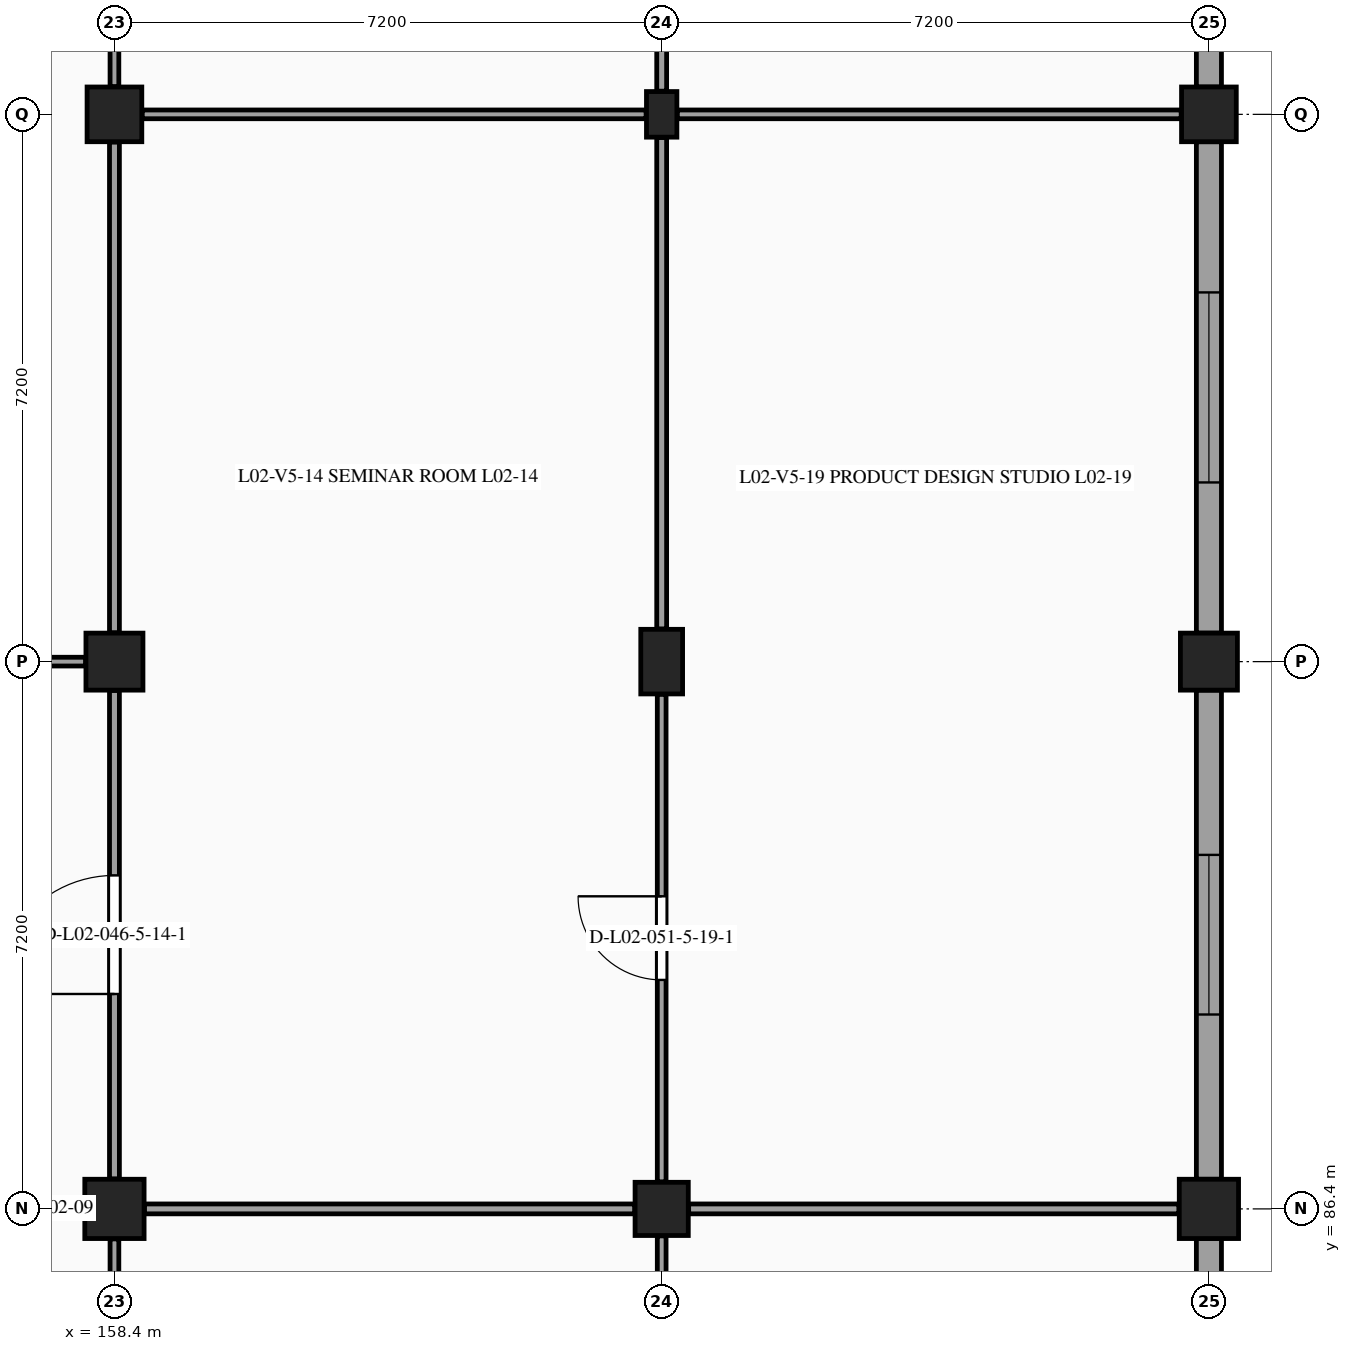
"""IFC4 building model, lengths in metres.
Left out: names, types, materials, properties, quantities, classifications, styles, units other than length and angle.
Written with IfcOpenShell. Run it as: python <this file> out.ifc"""

import sys

from ifc_helpers import new_model, si_unit, direction, frame, frame_2d, origin, origin_2d, place, context, subcontext, project, spatial, rectangle, extrude, element, fill, save


model = new_model("IFC4")
c1 = context("Model", 3, precision=1e-05, world=origin(), true_north=direction((0.0, 1.0)))
c2 = subcontext(c1, "Body", "Model", "MODEL_VIEW")
j1 = project(units=[si_unit("LENGTHUNIT", "METRE"), si_unit("PLANEANGLEUNIT", "RADIAN")], contexts=[c1])
p1 = place(None, origin())
s1 = spatial("IfcSite", under=j1, at=p1, CompositionType="ELEMENT")
p2 = place(p1, origin())
s2 = spatial("IfcBuilding", under=s1, at=p2, CompositionType="ELEMENT")
p3 = place(p2, frame((0.0, 0.0, 9.9)))
s3 = spatial("IfcBuildingStorey", under=s2, at=p3, CompositionType="ELEMENT", Elevation=9.9)
p4 = place(p3, frame((158.4, 86.4, 0.0), z_axis=(0.0, 0.0, 1.0), x_axis=(1.0, 0.0, 0.0)))
e1 = element("IfcColumn", 1, at=p4, inside=s3, PredefinedType="COLUMN", context=c2, shape_type="SweptSolid", body=[
    extrude(rectangle(XDim=0.78, YDim=0.78, at=origin_2d()), origin(), (0.0, 0.0, 1.0), 4.5),
])
p5 = place(p3, frame((158.4, 93.6, 0.0), z_axis=(0.0, 0.0, 1.0), x_axis=(1.0, 0.0, 0.0)))
e2 = element("IfcColumn", 2, at=p5, inside=s3, PredefinedType="COLUMN", context=c2, shape_type="SweptSolid", body=[
    extrude(rectangle(XDim=0.75, YDim=0.75, at=origin_2d()), origin(), (0.0, 0.0, 1.0), 4.5),
])
p6 = place(p3, frame((158.4, 100.8, 0.0), z_axis=(0.0, 0.0, 1.0), x_axis=(1.0, 0.0, 0.0)))
e3 = element("IfcColumn", 3, at=p6, inside=s3, PredefinedType="COLUMN", context=c2, shape_type="SweptSolid", body=[
    extrude(rectangle(XDim=0.72, YDim=0.72, at=origin_2d()), origin(), (0.0, 0.0, 1.0), 4.5),
])
p7 = place(p3, frame((165.6, 86.4, 0.0), z_axis=(0.0, 0.0, 1.0), x_axis=(1.0, 0.0, 0.0)))
e4 = element("IfcColumn", 4, at=p7, inside=s3, PredefinedType="COLUMN", context=c2, shape_type="SweptSolid", body=[
    extrude(rectangle(XDim=0.7, YDim=0.7, at=origin_2d()), origin(), (0.0, 0.0, 1.0), 4.5),
])
p8 = place(p3, frame((165.6, 93.6, 0.0), z_axis=(0.0, 0.0, 1.0), x_axis=(1.0, 0.0, 0.0)))
e5 = element("IfcColumn", 5, at=p8, inside=s3, PredefinedType="COLUMN", context=c2, shape_type="SweptSolid", body=[
    extrude(rectangle(XDim=0.55, YDim=0.85, at=origin_2d()), origin(), (0.0, 0.0, 1.0), 4.5),
])
p9 = place(p3, frame((165.6, 100.8, 0.0), z_axis=(0.0, 0.0, 1.0), x_axis=(1.0, 0.0, 0.0)))
e6 = element("IfcColumn", 6, at=p9, inside=s3, PredefinedType="PILASTER", context=c2, shape_type="SweptSolid", body=[
    extrude(rectangle(XDim=0.4, YDim=0.6, at=origin_2d()), origin(), (0.0, 0.0, 1.0), 4.5),
])
p10 = place(p3, frame((172.8, 86.4, 0.0), z_axis=(0.0, 0.0, 1.0), x_axis=(1.0, 0.0, 0.0)))
e7 = element("IfcColumn", 7, at=p10, inside=s3, PredefinedType="COLUMN", context=c2, shape_type="SweptSolid", body=[
    extrude(rectangle(XDim=0.78, YDim=0.78, at=origin_2d()), origin(), (0.0, 0.0, 1.0), 4.5),
])
p11 = place(p3, frame((172.8, 93.6, 0.0), z_axis=(0.0, 0.0, 1.0), x_axis=(1.0, 0.0, 0.0)))
e8 = element("IfcColumn", 8, at=p11, inside=s3, PredefinedType="COLUMN", context=c2, shape_type="SweptSolid", body=[
    extrude(rectangle(XDim=0.75, YDim=0.75, at=origin_2d()), origin(), (0.0, 0.0, 1.0), 4.5),
])
p12 = place(p3, frame((172.8, 100.8, 0.0), z_axis=(0.0, 0.0, 1.0), x_axis=(1.0, 0.0, 0.0)))
e9 = element("IfcColumn", 9, at=p12, inside=s3, PredefinedType="COLUMN", context=c2, shape_type="SweptSolid", body=[
    extrude(rectangle(XDim=0.72, YDim=0.72, at=origin_2d()), origin(), (0.0, 0.0, 1.0), 4.5),
])
p13 = place(p3, frame((172.8, 107.65, 0.0), z_axis=(0.0, 0.0, 1.0), x_axis=(0.0, -1.0, 0.0)))
e10 = element("IfcWall", 10, at=p13, inside=s3, PredefinedType="STANDARD", context=c2, shape_type="SweptSolid", body=[
    extrude(rectangle(XDim=6.49, YDim=0.33, at=frame_2d((3.245, 0.0))), origin(), (0.0, 0.0, 1.0), 3.47),
])
p14 = place(p13, frame((1.795, 0.0, 0.98)))
e11 = element("IfcOpeningElement", 11, at=p14, cuts=e10, PredefinedType="OPENING", context=c2, shape_type="SweptSolid", body=[
    extrude(rectangle(XDim=2.9, YDim=1.6, at=frame_2d((1.45, 0.8))), frame((0.0, 0.175, 0.0), z_axis=(0.0, -1.0, 0.0), x_axis=(1.0, 0.0, 0.0)), (0.0, 0.0, 1.0), 0.35),
])
p15 = place(p3, frame((172.8, 100.44, 0.0), z_axis=(0.0, 0.0, 1.0), x_axis=(0.0, -1.0, 0.0)))
e12 = element("IfcWall", 12, at=p15, inside=s3, PredefinedType="STANDARD", context=c2, shape_type="SweptSolid", body=[
    extrude(rectangle(XDim=6.465, YDim=0.33, at=frame_2d((3.232, 0.0))), origin(), (0.0, 0.0, 1.0), 3.47),
])
p16 = place(p15, frame((1.982, 0.0, 0.98)))
e13 = element("IfcOpeningElement", 13, at=p16, cuts=e12, PredefinedType="OPENING", context=c2, shape_type="SweptSolid", body=[
    extrude(rectangle(XDim=2.5, YDim=1.35, at=frame_2d((1.25, 0.675))), frame((0.0, 0.175, 0.0), z_axis=(0.0, -1.0, 0.0), x_axis=(1.0, 0.0, 0.0)), (0.0, 0.0, 1.0), 0.35),
])
p17 = place(p3, frame((172.8, 93.225, 0.0), z_axis=(0.0, 0.0, 1.0), x_axis=(0.0, -1.0, 0.0)))
e14 = element("IfcWall", 14, at=p17, inside=s3, PredefinedType="STANDARD", context=c2, shape_type="SweptSolid", body=[
    extrude(rectangle(XDim=6.435, YDim=0.33, at=frame_2d((3.218, 0.0))), origin(), (0.0, 0.0, 1.0), 3.47),
])
p18 = place(p17, frame((2.167, 0.0, 0.98)))
e15 = element("IfcOpeningElement", 15, at=p18, cuts=e14, PredefinedType="OPENING", context=c2, shape_type="SweptSolid", body=[
    extrude(rectangle(XDim=2.1, YDim=1.3, at=frame_2d((1.05, 0.65))), frame((0.0, 0.175, 0.0), z_axis=(0.0, -1.0, 0.0), x_axis=(1.0, 0.0, 0.0)), (0.0, 0.0, 1.0), 0.35),
])
p19 = place(p3, frame((172.8, 86.01, 0.0), z_axis=(0.0, 0.0, 1.0), x_axis=(0.0, -1.0, 0.0)))
e16 = element("IfcWall", 16, at=p19, inside=s3, PredefinedType="STANDARD", context=c2, shape_type="SweptSolid", body=[
    extrude(rectangle(XDim=6.51, YDim=0.33, at=frame_2d((3.255, 0.0))), origin(), (0.0, 0.0, 1.0), 3.47),
])
p20 = place(p19, frame((0.855, 0.0, 0.98)))
e17 = element("IfcOpeningElement", 17, at=p20, cuts=e16, PredefinedType="OPENING", context=c2, shape_type="SweptSolid", body=[
    extrude(rectangle(XDim=4.8, YDim=1.5, at=frame_2d((2.4, 0.75))), frame((0.0, 0.175, 0.0), z_axis=(0.0, -1.0, 0.0), x_axis=(1.0, 0.0, 0.0)), (0.0, 0.0, 1.0), 0.35),
])
p21 = place(p3, frame((158.4, 79.505, 0.0), z_axis=(0.0, 0.0, 1.0), x_axis=(0.0, 1.0, 0.0)))
e18 = element("IfcWall", 18, at=p21, inside=s3, PredefinedType="PARTITIONING", context=c2, shape_type="SweptSolid", body=[
    extrude(rectangle(XDim=6.5, YDim=0.115, at=frame_2d((3.25, 0.0))), origin(), (0.0, 0.0, 1.0), 3.595),
])
p22 = place(p3, frame((158.4, 86.795, 0.0), z_axis=(0.0, 0.0, 1.0), x_axis=(0.0, 1.0, 0.0)))
e19 = element("IfcWall", 19, at=p22, inside=s3, PredefinedType="PARTITIONING", context=c2, shape_type="SweptSolid", body=[
    extrude(rectangle(XDim=6.425, YDim=0.13, at=frame_2d((3.212, 0.0))), origin(), (0.0, 0.0, 1.0), 3.59),
])
p23 = place(p22, frame((2.433, 0.0, 0.0)))
e20 = element("IfcOpeningElement", 20, at=p23, cuts=e19, PredefinedType="OPENING", context=c2, shape_type="SweptSolid", body=[
    extrude(rectangle(XDim=1.56, YDim=2.25, at=frame_2d((0.78, 1.125))), frame((0.0, 0.075, 0.0), z_axis=(0.0, -1.0, 0.0), x_axis=(1.0, 0.0, 0.0)), (0.0, 0.0, 1.0), 0.15),
])
p24 = place(p3, frame((151.48, 93.6, 0.0), z_axis=(0.0, 0.0, 1.0), x_axis=(1.0, 0.0, 0.0)))
e21 = element("IfcWall", 21, at=p24, inside=s3, PredefinedType="PARTITIONING", context=c2, shape_type="SweptSolid", body=[
    extrude(rectangle(XDim=6.54, YDim=0.115, at=frame_2d((3.27, 0.0))), origin(), (0.0, 0.0, 1.0), 3.5),
])
p25 = place(p3, frame((158.4, 93.98, 0.0), z_axis=(0.0, 0.0, 1.0), x_axis=(0.0, 1.0, 0.0)))
e22 = element("IfcWall", 22, at=p25, inside=s3, PredefinedType="PARTITIONING", context=c2, shape_type="SweptSolid", body=[
    extrude(rectangle(XDim=6.455, YDim=0.13, at=frame_2d((3.228, 0.0))), origin(), (0.0, 0.0, 1.0), 3.54),
])
p26 = place(p3, frame((158.4, 101.165, 0.0), z_axis=(0.0, 0.0, 1.0), x_axis=(0.0, 1.0, 0.0)))
e23 = element("IfcWall", 23, at=p26, inside=s3, PredefinedType="PARTITIONING", context=c2, shape_type="SweptSolid", body=[
    extrude(rectangle(XDim=6.48, YDim=0.115, at=frame_2d((3.24, 0.0))), origin(), (0.0, 0.0, 1.0), 3.54),
])
p27 = place(p26, frame((2.55, 0.0, 0.0)))
e24 = element("IfcOpeningElement", 24, at=p27, cuts=e23, PredefinedType="OPENING", context=c2, shape_type="SweptSolid", body=[
    extrude(rectangle(XDim=1.38, YDim=2.22, at=frame_2d((0.69, 1.11))), frame((0.0, 0.067, 0.0), z_axis=(0.0, -1.0, 0.0), x_axis=(1.0, 0.0, 0.0)), (0.0, 0.0, 1.0), 0.135),
])
p28 = place(p3, frame((165.6, 79.565, 0.0), z_axis=(0.0, 0.0, 1.0), x_axis=(0.0, 1.0, 0.0)))
e25 = element("IfcWall", 25, at=p28, inside=s3, PredefinedType="PARTITIONING", context=c2, shape_type="SweptSolid", body=[
    extrude(rectangle(XDim=6.48, YDim=0.115, at=frame_2d((3.24, 0.0))), origin(), (0.0, 0.0, 1.0), 3.595),
])
p29 = place(p3, frame((158.795, 86.4, 0.0), z_axis=(0.0, 0.0, 1.0), x_axis=(1.0, 0.0, 0.0)))
e26 = element("IfcWall", 26, at=p29, inside=s3, PredefinedType="PARTITIONING", context=c2, shape_type="SweptSolid", body=[
    extrude(rectangle(XDim=6.45, YDim=0.13, at=frame_2d((3.225, 0.0))), origin(), (0.0, 0.0, 1.0), 3.505),
])
p30 = place(p3, frame((165.6, 86.755, 0.0), z_axis=(0.0, 0.0, 1.0), x_axis=(0.0, 1.0, 0.0)))
e27 = element("IfcWall", 27, at=p30, inside=s3, PredefinedType="PARTITIONING", context=c2, shape_type="SweptSolid", body=[
    extrude(rectangle(XDim=6.415, YDim=0.115, at=frame_2d((3.208, 0.0))), origin(), (0.0, 0.0, 1.0), 3.59),
])
p31 = place(p30, frame((2.657, 0.0, 0.0)))
e28 = element("IfcOpeningElement", 28, at=p31, cuts=e27, PredefinedType="OPENING", context=c2, shape_type="SweptSolid", body=[
    extrude(rectangle(XDim=1.1, YDim=2.15, at=frame_2d((0.55, 1.075))), frame((0.0, 0.067, 0.0), z_axis=(0.0, -1.0, 0.0), x_axis=(1.0, 0.0, 0.0)), (0.0, 0.0, 1.0), 0.135),
])
p32 = place(p3, frame((165.6, 94.03, 0.0), z_axis=(0.0, 0.0, 1.0), x_axis=(0.0, 1.0, 0.0)))
e29 = element("IfcWall", 29, at=p32, inside=s3, PredefinedType="PARTITIONING", context=c2, shape_type="SweptSolid", body=[
    extrude(rectangle(XDim=6.465, YDim=0.13, at=frame_2d((3.232, 0.0))), origin(), (0.0, 0.0, 1.0), 3.54),
])
p33 = place(p3, frame((158.765, 100.8, 0.0), z_axis=(0.0, 0.0, 1.0), x_axis=(1.0, 0.0, 0.0)))
e30 = element("IfcWall", 30, at=p33, inside=s3, PredefinedType="PARTITIONING", context=c2, shape_type="SweptSolid", body=[
    extrude(rectangle(XDim=6.63, YDim=0.115, at=frame_2d((3.315, 0.0))), origin(), (0.0, 0.0, 1.0), 3.505),
])
p34 = place(p3, frame((165.6, 101.105, 0.0), z_axis=(0.0, 0.0, 1.0), x_axis=(0.0, 1.0, 0.0)))
e31 = element("IfcWall", 31, at=p34, inside=s3, PredefinedType="PARTITIONING", context=c2, shape_type="SweptSolid", body=[
    extrude(rectangle(XDim=6.5, YDim=0.13, at=frame_2d((3.25, 0.0))), origin(), (0.0, 0.0, 1.0), 3.54),
])
p35 = place(p34, frame((2.775, 0.0, 0.0)))
e32 = element("IfcOpeningElement", 32, at=p35, cuts=e31, PredefinedType="OPENING", context=c2, shape_type="SweptSolid", body=[
    extrude(rectangle(XDim=0.95, YDim=2.15, at=frame_2d((0.475, 1.075))), frame((0.0, 0.075, 0.0), z_axis=(0.0, -1.0, 0.0), x_axis=(1.0, 0.0, 0.0)), (0.0, 0.0, 1.0), 0.15),
])
p36 = place(p3, frame((165.955, 86.4, 0.0), z_axis=(0.0, 0.0, 1.0), x_axis=(1.0, 0.0, 0.0)))
e33 = element("IfcWall", 33, at=p36, inside=s3, PredefinedType="PARTITIONING", context=c2, shape_type="SweptSolid", body=[
    extrude(rectangle(XDim=6.45, YDim=0.13, at=frame_2d((3.225, 0.0))), origin(), (0.0, 0.0, 1.0), 3.525),
])
p37 = place(p3, frame((165.805, 100.8, 0.0), z_axis=(0.0, 0.0, 1.0), x_axis=(1.0, 0.0, 0.0)))
e34 = element("IfcWall", 34, at=p37, inside=s3, PredefinedType="PARTITIONING", context=c2, shape_type="SweptSolid", body=[
    extrude(rectangle(XDim=6.63, YDim=0.115, at=frame_2d((3.315, 0.0))), origin(), (0.0, 0.0, 1.0), 3.525),
])
p38 = place(p16, origin())
e35 = element("IfcWindow", 35, at=p38, inside=s3, PartitioningType="SINGLE_PANEL", PredefinedType="WINDOW", context=c2, shape_type="SweptSolid", body=[
    extrude(rectangle(XDim=2.5, YDim=1.35, at=frame_2d((1.25, 0.675))), frame((0.0, -0.03, 0.0), z_axis=(0.0, -1.0, 0.0), x_axis=(1.0, 0.0, 0.0)), (0.0, 0.0, 1.0), 0.06),
])
fill(e13, e35)
p39 = place(p18, origin())
e36 = element("IfcWindow", 36, at=p39, inside=s3, PartitioningType="SINGLE_PANEL", PredefinedType="WINDOW", context=c2, shape_type="SweptSolid", body=[
    extrude(rectangle(XDim=2.1, YDim=1.3, at=frame_2d((1.05, 0.65))), frame((0.0, -0.03, 0.0), z_axis=(0.0, -1.0, 0.0), x_axis=(1.0, 0.0, 0.0)), (0.0, 0.0, 1.0), 0.06),
])
fill(e15, e36)
p40 = place(p23, origin())
e37 = element("IfcDoor", 37, at=p40, inside=s3, OperationType="SINGLE_SWING_LEFT", PredefinedType="DOOR", context=c2, shape_type="SweptSolid", body=[
    extrude(rectangle(XDim=1.56, YDim=2.25, at=frame_2d((0.78, 1.125))), frame((0.0, 0.025, 0.0), z_axis=(0.0, -1.0, 0.0), x_axis=(1.0, 0.0, 0.0)), (0.0, 0.0, 1.0), 0.05),
])
fill(e20, e37)
p41 = place(p31, origin())
e38 = element("IfcDoor", 38, at=p41, inside=s3, OperationType="SINGLE_SWING_RIGHT", PredefinedType="DOOR", context=c2, shape_type="SweptSolid", body=[
    extrude(rectangle(XDim=1.1, YDim=2.15, at=frame_2d((0.55, 1.075))), frame((0.0, 0.025, 0.0), z_axis=(0.0, -1.0, 0.0), x_axis=(1.0, 0.0, 0.0)), (0.0, 0.0, 1.0), 0.05),
])
fill(e28, e38)
save(model, sys.argv[1])
